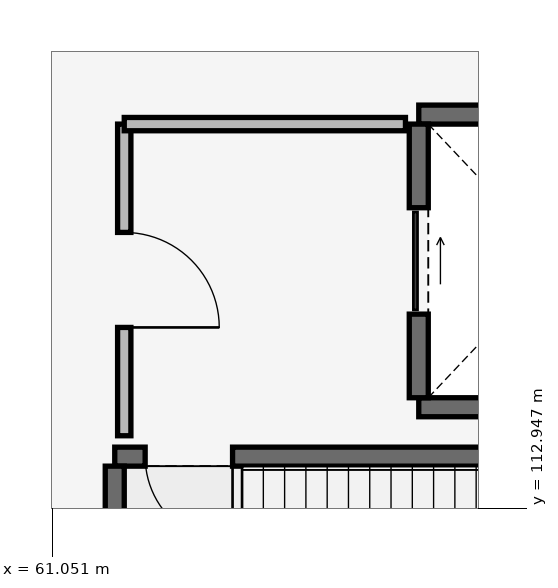
"""IFC4 building model, lengths in metres.
Left out: names, types, materials, properties, quantities, classifications, styles, units other than length and angle.
Written with IfcOpenShell. Run it as: python <this file> out.ifc"""

import sys

from ifc_helpers import new_model, si_unit, direction, frame, frame_2d, origin, place, context, subcontext, project, spatial, rectangle, extrude, element, fill, save


model = new_model("IFC4")
c1 = context("Model", 3, precision=1e-05, world=origin(), true_north=direction((0.0, 1.0)))
c2 = subcontext(c1, "Body", "Model", "MODEL_VIEW")
j1 = project(units=[si_unit("LENGTHUNIT", "METRE"), si_unit("PLANEANGLEUNIT", "RADIAN")], contexts=[c1])
p1 = place(None, origin())
s1 = spatial("IfcSite", under=j1, at=p1, CompositionType="ELEMENT")
p2 = place(p1, origin())
s2 = spatial("IfcBuilding", under=s1, at=p2, CompositionType="ELEMENT")
p3 = place(p2, origin())
s3 = spatial("IfcBuildingStorey", under=s2, at=p3, CompositionType="ELEMENT", Elevation=0.0)
p4 = place(p3, frame((61.875, 113.625, 0.0), z_axis=(0.0, 0.0, 1.0), x_axis=(1.0, 0.0, 0.0)))
e1 = element("IfcWall", 1, at=p4, inside=s3, PredefinedType="SHEAR", context=c2, shape_type="SweptSolid", body=[
    extrude(rectangle(XDim=7.27, YDim=0.25, at=frame_2d((3.635, 0.0))), origin(), (0.0, 0.0, 1.0), 5.08),
])
p5 = place(p4, frame((0.4, 0.0, 0.0)))
e2 = element("IfcOpeningElement", 2, at=p5, cuts=e1, PredefinedType="OPENING", context=c2, shape_type="SweptSolid", body=[
    extrude(rectangle(XDim=1.15, YDim=2.15, at=frame_2d((0.575, 1.075))), frame((0.0, 0.14, 0.0), z_axis=(0.0, -1.0, 0.0), x_axis=(1.0, 0.0, 0.0)), (0.0, 0.0, 1.0), 0.28),
])
p6 = place(p3, frame((61.875, 110.2, 0.0), z_axis=(0.0, 0.0, 1.0), x_axis=(0.0, 1.0, 0.0)))
e3 = element("IfcWall", 3, at=p6, inside=s3, PredefinedType="SHEAR", context=c2, shape_type="SweptSolid", body=[
    extrude(rectangle(XDim=3.3, YDim=0.25, at=frame_2d((1.65, 0.0))), origin(), (0.0, 0.0, 1.0), 5.08),
])
for number, where, z_axis, x_axis in (
    (4, (65.875, 114.275, 0.0), (0.0, 0.0, 1.0), (1.0, 0.0, 0.0)),
    (5, (65.875, 118.125, 0.0), (0.0, 0.0, 1.0), (1.0, 0.0, 0.0)),
):
    element("IfcWall", number, at=place(p3, frame(where, z_axis=z_axis, x_axis=x_axis)), inside=s3, PredefinedType="SHEAR", context=c2, shape_type="SweptSolid", body=[
        extrude(rectangle(XDim=3.65, YDim=0.25, at=frame_2d((1.825, 0.0))), origin(), (0.0, 0.0, 1.0), 5.08),
    ])
p7 = place(p3, frame((65.875, 114.4, 0.0), z_axis=(0.0, 0.0, 1.0), x_axis=(0.0, 1.0, 0.0)))
e6 = element("IfcWall", 6, at=p7, inside=s3, PredefinedType="SHEAR", context=c2, shape_type="SweptSolid", body=[
    extrude(rectangle(XDim=3.6, YDim=0.25, at=frame_2d((1.8, 0.0))), origin(), (0.0, 0.0, 1.0), 5.08),
])
p8 = place(p7, frame((1.1, 0.0, 0.0)))
e7 = element("IfcOpeningElement", 7, at=p8, cuts=e6, PredefinedType="OPENING", context=c2, shape_type="SweptSolid", body=[
    extrude(rectangle(XDim=1.4, YDim=2.2, at=frame_2d((0.7, 1.1))), frame((0.0, 0.14, 0.0), z_axis=(0.0, -1.0, 0.0), x_axis=(1.0, 0.0, 0.0)), (0.0, 0.0, 1.0), 0.28),
])
p9 = place(p3, frame((62.0, 113.9, 0.0), z_axis=(0.0, 0.0, 1.0), x_axis=(0.0, 1.0, 0.0)))
e8 = element("IfcWall", 8, at=p9, inside=s3, PredefinedType="PARTITIONING", context=c2, shape_type="SweptSolid", body=[
    extrude(rectangle(XDim=4.1, YDim=0.175, at=frame_2d((2.05, 0.0))), origin(), (0.0, 0.0, 1.0), 5.08),
])
p10 = place(p9, frame((1.425, 0.0, 0.0)))
e9 = element("IfcOpeningElement", 9, at=p10, cuts=e8, PredefinedType="OPENING", context=c2, shape_type="SweptSolid", body=[
    extrude(rectangle(XDim=1.25, YDim=2.2, at=frame_2d((0.625, 1.1))), frame((0.0, 0.103, 0.0), z_axis=(0.0, -1.0, 0.0), x_axis=(1.0, 0.0, 0.0)), (0.0, 0.0, 1.0), 0.205),
])
p11 = place(p3, frame((62.0, 118.0, 0.0), z_axis=(0.0, 0.0, 1.0), x_axis=(1.0, 0.0, 0.0)))
e10 = element("IfcWall", 10, at=p11, inside=s3, PredefinedType="PARTITIONING", context=c2, shape_type="SweptSolid", body=[
    extrude(rectangle(XDim=3.7, YDim=0.175, at=frame_2d((1.85, 0.0))), origin(), (0.0, 0.0, 1.0), 5.08),
])
p12 = place(p5, origin())
e11 = element("IfcDoor", 11, at=p12, inside=s3, OperationType="SINGLE_SWING_RIGHT", PredefinedType="DOOR", context=c2, shape_type="SweptSolid", body=[
    extrude(rectangle(XDim=1.15, YDim=2.15, at=frame_2d((0.575, 1.075))), frame((0.0, 0.025, 0.0), z_axis=(0.0, -1.0, 0.0), x_axis=(1.0, 0.0, 0.0)), (0.0, 0.0, 1.0), 0.05),
])
fill(e2, e11)
p13 = place(p8, origin())
e12 = element("IfcDoor", 12, at=p13, inside=s3, OperationType="SLIDING_TO_RIGHT", PredefinedType="DOOR", context=c2, shape_type="SweptSolid", body=[
    extrude(rectangle(XDim=1.4, YDim=2.2, at=frame_2d((0.7, 1.1))), frame((0.0, 0.025, 0.0), z_axis=(0.0, -1.0, 0.0), x_axis=(1.0, 0.0, 0.0)), (0.0, 0.0, 1.0), 0.05),
])
fill(e7, e12)
p14 = place(p10, frame((1.25, 0.0, 0.0), z_axis=(0.0, 0.0, 1.0), x_axis=(-1.0, 0.0, 0.0)))
e13 = element("IfcDoor", 13, at=p14, inside=s3, OperationType="SINGLE_SWING_LEFT", PredefinedType="DOOR", context=c2, shape_type="SweptSolid", body=[
    extrude(rectangle(XDim=1.25, YDim=2.2, at=frame_2d((0.625, 1.1))), frame((0.0, 0.025, 0.0), z_axis=(0.0, -1.0, 0.0), x_axis=(1.0, 0.0, 0.0)), (0.0, 0.0, 1.0), 0.05),
])
fill(e9, e13)
save(model, sys.argv[1])
